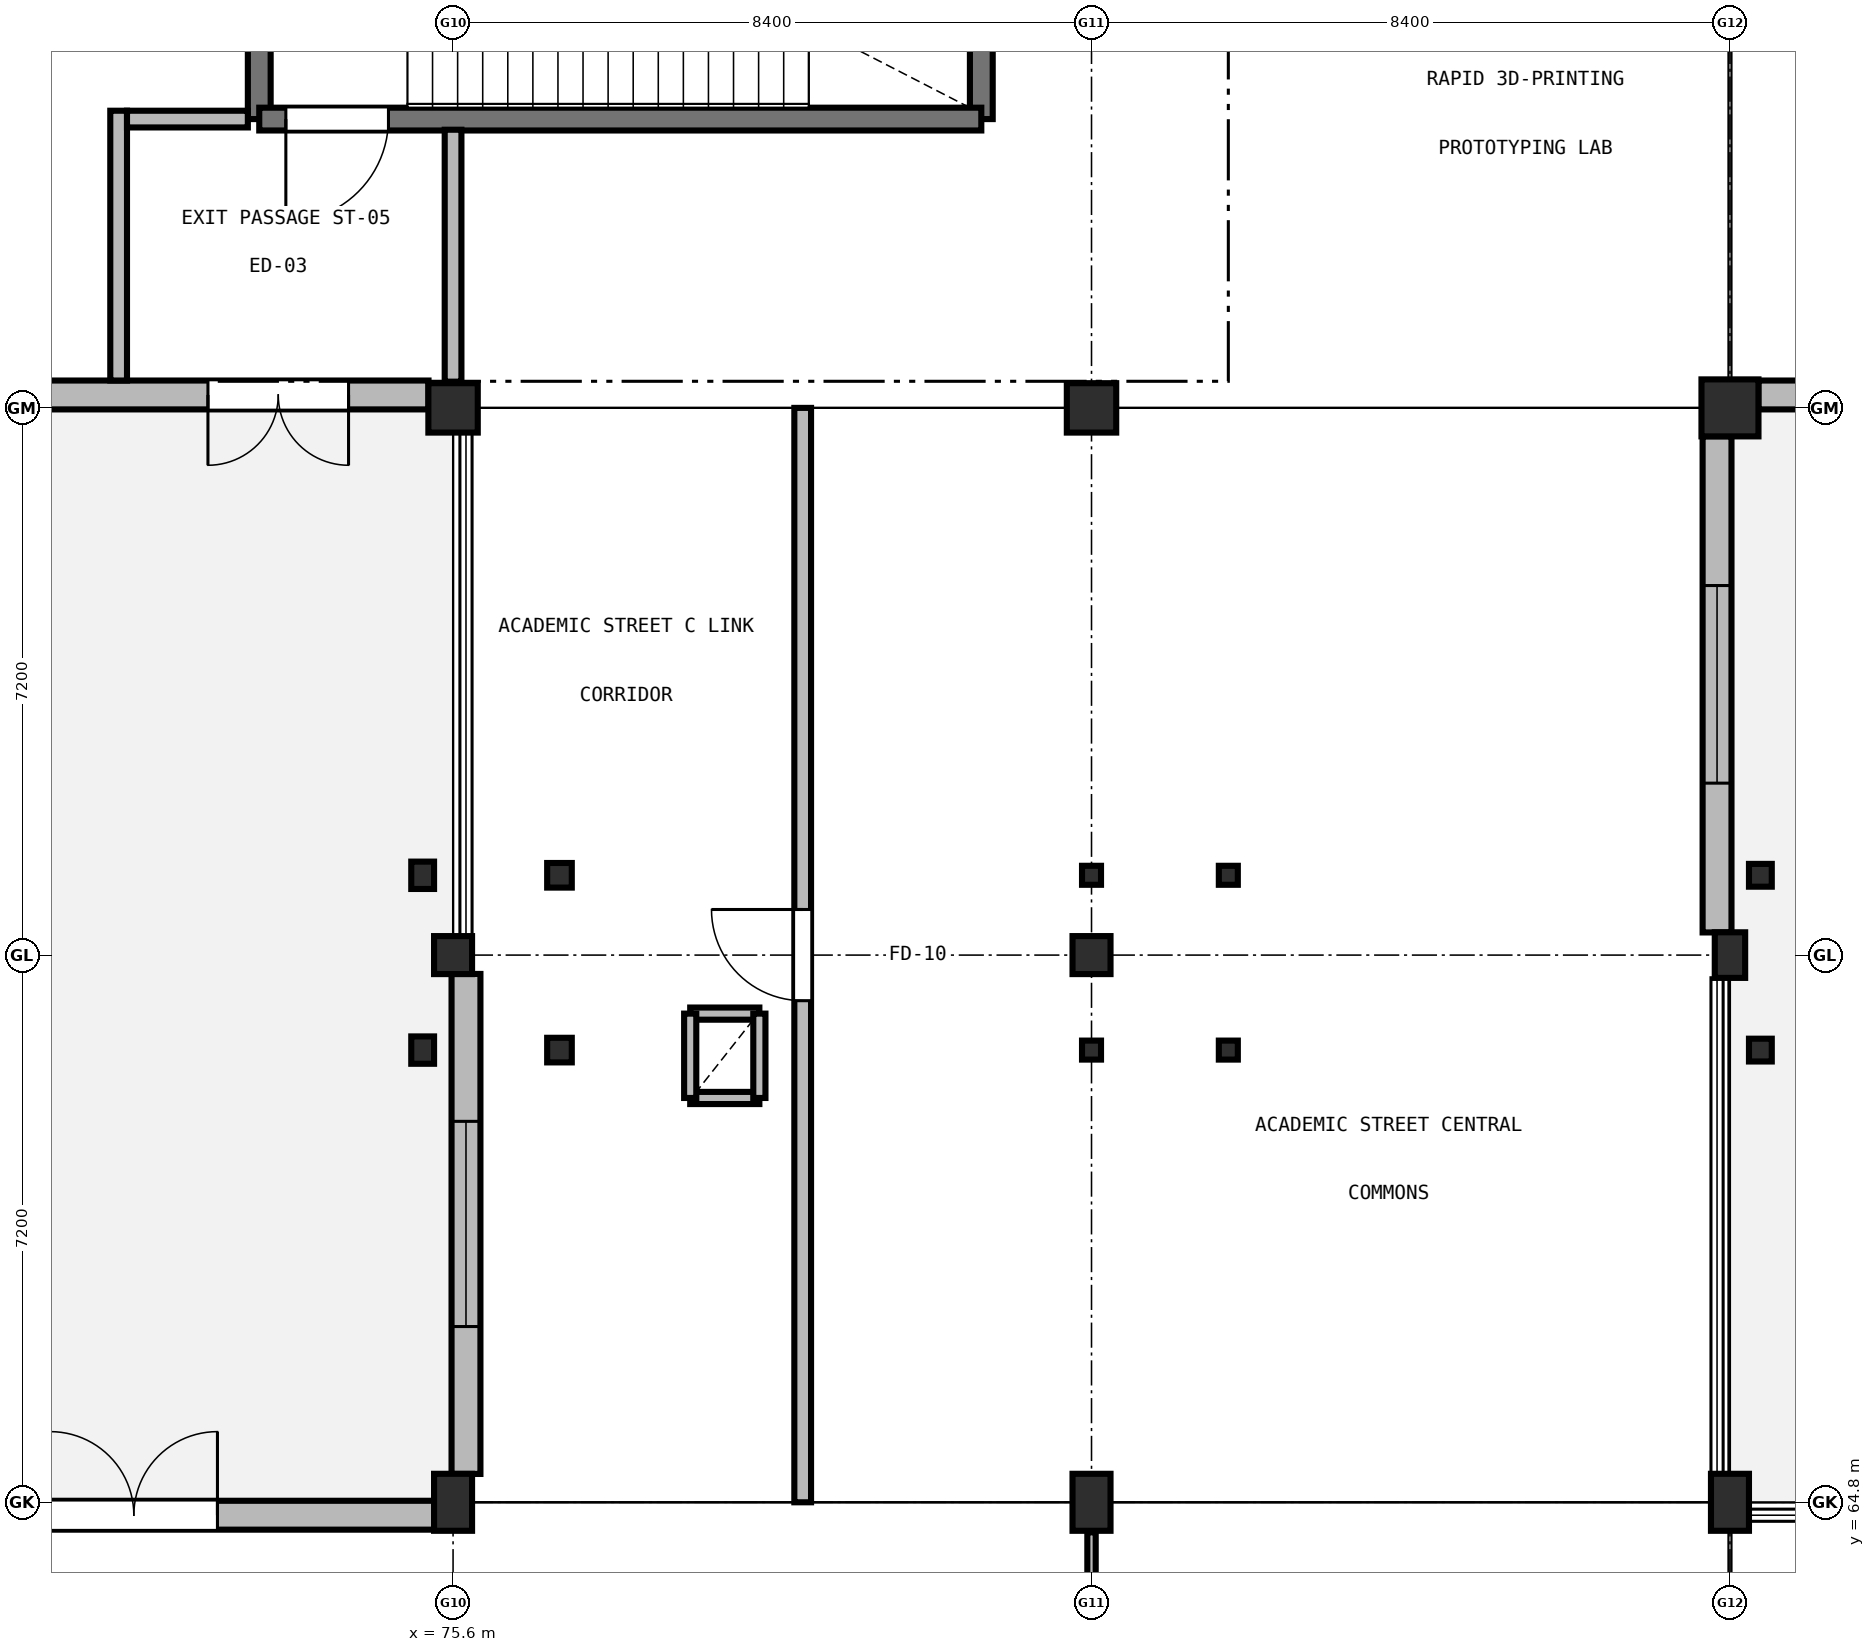
"""IFC4 building model, lengths in metres.
Left out: names, types, materials, properties, quantities, classifications, styles, units other than length and angle.
Written with IfcOpenShell. Run it as: python <this file> out.ifc"""

import sys

from ifc_helpers import new_model, si_unit, direction, frame, frame_2d, origin, origin_2d, place, context, subcontext, project, spatial, rectangle, hollow_rectangle, hollow_circle, i_section, extrude, element, fill, save


model = new_model("IFC4")
c1 = context("Model", 3, precision=1e-05, world=origin(), true_north=direction((0.0, 1.0)))
c2 = subcontext(c1, "Body", "Model", "MODEL_VIEW")
j1 = project(units=[si_unit("LENGTHUNIT", "METRE"), si_unit("PLANEANGLEUNIT", "RADIAN")], contexts=[c1])
p1 = place(None, origin())
s1 = spatial("IfcSite", under=j1, at=p1, CompositionType="ELEMENT")
p2 = place(p1, origin())
s2 = spatial("IfcBuilding", under=s1, at=p2, CompositionType="ELEMENT")
p3 = place(p2, origin())
s3 = spatial("IfcBuildingStorey", under=s2, at=p3, CompositionType="ELEMENT", Elevation=0.0)
p4 = place(p3, frame((75.6, 64.8, 0.0), z_axis=(0.0, 0.0, 1.0), x_axis=(1.0, 0.0, 0.0)))
e1 = element("IfcColumn", 1, at=p4, inside=s3, PredefinedType="COLUMN", context=c2, shape_type="SweptSolid", body=[
    extrude(rectangle(XDim=0.5, YDim=0.75, at=origin_2d()), origin(), (0.0, 0.0, 1.0), 5.1),
])
p5 = place(p3, frame((75.6, 72.0, 0.0), z_axis=(0.0, 0.0, 1.0), x_axis=(1.0, 0.0, 0.0)))
e2 = element("IfcColumn", 2, at=p5, inside=s3, PredefinedType="COLUMN", context=c2, shape_type="SweptSolid", body=[
    extrude(rectangle(XDim=0.5, YDim=0.5, at=origin_2d()), origin(), (0.0, 0.0, 1.0), 5.1),
])
p6 = place(p3, frame((75.6, 79.2, 0.0), z_axis=(0.0, 0.0, 1.0), x_axis=(1.0, 0.0, 0.0)))
e3 = element("IfcColumn", 3, at=p6, inside=s3, PredefinedType="COLUMN", context=c2, shape_type="SweptSolid", body=[
    extrude(rectangle(XDim=0.65, YDim=0.65, at=origin_2d()), origin(), (0.0, 0.0, 1.0), 5.1),
])
p7 = place(p3, frame((84.0, 64.8, 0.0), z_axis=(0.0, 0.0, 1.0), x_axis=(1.0, 0.0, 0.0)))
e4 = element("IfcColumn", 4, at=p7, inside=s3, PredefinedType="COLUMN", context=c2, shape_type="SweptSolid", body=[
    extrude(rectangle(XDim=0.5, YDim=0.75, at=origin_2d()), origin(), (0.0, 0.0, 1.0), 5.1),
])
p8 = place(p3, frame((84.0, 72.0, 0.0), z_axis=(0.0, 0.0, 1.0), x_axis=(1.0, 0.0, 0.0)))
e5 = element("IfcColumn", 5, at=p8, inside=s3, PredefinedType="COLUMN", context=c2, shape_type="SweptSolid", body=[
    extrude(rectangle(XDim=0.5, YDim=0.5, at=origin_2d()), origin(), (0.0, 0.0, 1.0), 5.1),
])
p9 = place(p3, frame((84.0, 79.2, 0.0), z_axis=(0.0, 0.0, 1.0), x_axis=(1.0, 0.0, 0.0)))
e6 = element("IfcColumn", 6, at=p9, inside=s3, PredefinedType="COLUMN", context=c2, shape_type="SweptSolid", body=[
    extrude(rectangle(XDim=0.65, YDim=0.65, at=origin_2d()), origin(), (0.0, 0.0, 1.0), 5.1),
])
p10 = place(p3, frame((92.4, 64.8, 0.0), z_axis=(0.0, 0.0, 1.0), x_axis=(1.0, 0.0, 0.0)))
e7 = element("IfcColumn", 7, at=p10, inside=s3, PredefinedType="COLUMN", context=c2, shape_type="SweptSolid", body=[
    extrude(rectangle(XDim=0.5, YDim=0.75, at=origin_2d()), origin(), (0.0, 0.0, 1.0), 5.1),
])
p11 = place(p3, frame((92.4, 72.0, 0.0), z_axis=(0.0, 0.0, 1.0), x_axis=(1.0, 0.0, 0.0)))
e8 = element("IfcColumn", 8, at=p11, inside=s3, PredefinedType="COLUMN", context=c2, shape_type="SweptSolid", body=[
    extrude(rectangle(XDim=0.4, YDim=0.6, at=origin_2d()), origin(), (0.0, 0.0, 1.0), 5.1),
])
p12 = place(p3, frame((92.4, 79.2, 0.0), z_axis=(0.0, 0.0, 1.0), x_axis=(1.0, 0.0, 0.0)))
e9 = element("IfcColumn", 9, at=p12, inside=s3, PredefinedType="COLUMN", context=c2, shape_type="SweptSolid", body=[
    extrude(rectangle(XDim=0.75, YDim=0.75, at=origin_2d()), origin(), (0.0, 0.0, 1.0), 5.1),
])
for number, where, z_axis, x_axis in (
    (10, (92.8, 70.75, 0.0), (0.0, 0.0, 1.0), (1.0, 0.0, 0.0)),
    (11, (92.8, 73.05, 0.0), (0.0, 0.0, 1.0), (1.0, 0.0, 0.0)),
):
    element("IfcColumn", number, at=place(p3, frame(where, z_axis=z_axis, x_axis=x_axis)), inside=s3, PredefinedType="COLUMN", context=c2, shape_type="SweptSolid", body=[
        extrude(i_section(OverallWidth=0.3, OverallDepth=0.3, WebThickness=0.011, FlangeThickness=0.019, FilletRadius=0.027, at=origin_2d()), origin(), (0.0, 0.0, 1.0), 5.1),
    ])
for number, where, z_axis, x_axis in (
    (12, (85.8, 70.75, 0.0), (0.0, 0.0, 1.0), (1.0, 0.0, 0.0)),
    (13, (85.8, 73.05, 0.0), (0.0, 0.0, 1.0), (1.0, 0.0, 0.0)),
    (14, (84.0, 70.75, 0.0), (0.0, 0.0, 1.0), (1.0, 0.0, 0.0)),
    (15, (84.0, 73.05, 0.0), (0.0, 0.0, 1.0), (1.0, 0.0, 0.0)),
):
    element("IfcColumn", number, at=place(p3, frame(where, z_axis=z_axis, x_axis=x_axis)), inside=s3, PredefinedType="COLUMN", context=c2, shape_type="SweptSolid", body=[
        extrude(hollow_rectangle(XDim=0.25, YDim=0.25, WallThickness=0.01, at=origin_2d()), origin(), (0.0, 0.0, 1.0), 5.1),
    ])
for number, where, z_axis, x_axis in (
    (16, (77.0, 70.75, 0.0), (0.0, 0.0, 1.0), (1.0, 0.0, 0.0)),
    (17, (77.0, 73.05, 0.0), (0.0, 0.0, 1.0), (1.0, 0.0, 0.0)),
):
    element("IfcColumn", number, at=place(p3, frame(where, z_axis=z_axis, x_axis=x_axis)), inside=s3, PredefinedType="COLUMN", context=c2, shape_type="SweptSolid", body=[
        extrude(hollow_circle(Radius=0.162, WallThickness=0.012, at=origin_2d()), origin(), (0.0, 0.0, 1.0), 5.1),
    ])
for number, where, z_axis, x_axis in (
    (18, (75.2, 70.75, 0.0), (0.0, 0.0, 1.0), (1.0, 0.0, 0.0)),
    (19, (75.2, 73.05, 0.0), (0.0, 0.0, 1.0), (1.0, 0.0, 0.0)),
):
    element("IfcColumn", number, at=place(p3, frame(where, z_axis=z_axis, x_axis=x_axis)), inside=s3, PredefinedType="COLUMN", context=c2, shape_type="SweptSolid", body=[
        extrude(i_section(OverallWidth=0.3, OverallDepth=0.36, WebThickness=0.012, FlangeThickness=0.022, FilletRadius=0.027, at=origin_2d()), origin(), (0.0, 0.0, 1.0), 5.1),
    ])
p13 = place(p3, frame((67.523, 64.63, 0.0), z_axis=(0.0, 0.0, 1.0), x_axis=(1.0, 0.0, 0.0)))
e20 = element("IfcWall", 20, at=p13, inside=s3, PredefinedType="SOLIDWALL", context=c2, shape_type="SweptSolid", body=[
    extrude(rectangle(XDim=7.829, YDim=0.38, at=frame_2d((3.915, 0.0))), origin(), (0.0, 0.0, 1.0), 4.01),
])
p14 = place(p13, frame((2.777, 0.0, 0.0)))
e21 = element("IfcOpeningElement", 21, at=p14, cuts=e20, PredefinedType="OPENING", context=c2, shape_type="SweptSolid", body=[
    extrude(rectangle(XDim=2.2, YDim=2.4, at=frame_2d((1.1, 1.2))), frame((0.0, 0.2, 0.0), z_axis=(0.0, -1.0, 0.0), x_axis=(1.0, 0.0, 0.0)), (0.0, 0.0, 1.0), 0.4),
])
p15 = place(p3, frame((75.77, 65.173, 0.0), z_axis=(0.0, 0.0, 1.0), x_axis=(0.0, 1.0, 0.0)))
e22 = element("IfcWall", 22, at=p15, inside=s3, PredefinedType="SOLIDWALL", context=c2, shape_type="SweptSolid", body=[
    extrude(rectangle(XDim=6.579, YDim=0.38, at=frame_2d((3.29, 0.0))), origin(), (0.0, 0.0, 1.0), 4.11),
])
p16 = place(p15, frame((1.939, 0.0, 0.95)))
e23 = element("IfcOpeningElement", 23, at=p16, cuts=e22, PredefinedType="OPENING", context=c2, shape_type="SweptSolid", body=[
    extrude(rectangle(XDim=2.7, YDim=1.9, at=frame_2d((1.35, 0.95))), frame((0.0, 0.2, 0.0), z_axis=(0.0, -1.0, 0.0), x_axis=(1.0, 0.0, 0.0)), (0.0, 0.0, 1.0), 0.4),
])
p17 = place(p3, frame((75.277, 79.37, 0.0), z_axis=(0.0, 0.0, 1.0), x_axis=(-1.0, 0.0, 0.0)))
e24 = element("IfcWall", 24, at=p17, inside=s3, PredefinedType="SOLIDWALL", context=c2, shape_type="SweptSolid", body=[
    extrude(rectangle(XDim=7.754, YDim=0.38, at=frame_2d((3.877, 0.0))), origin(), (0.0, 0.0, 1.0), 4.01),
])
p18 = place(p17, frame((1.052, 0.0, 0.0)))
e25 = element("IfcOpeningElement", 25, at=p18, cuts=e24, PredefinedType="OPENING", context=c2, shape_type="SweptSolid", body=[
    extrude(rectangle(XDim=1.85, YDim=2.3, at=frame_2d((0.925, 1.15))), frame((0.0, 0.2, 0.0), z_axis=(0.0, -1.0, 0.0), x_axis=(1.0, 0.0, 0.0)), (0.0, 0.0, 1.0), 0.4),
])
p19 = place(p3, frame((100.477, 79.37, 0.0), z_axis=(0.0, 0.0, 1.0), x_axis=(-1.0, 0.0, 0.0)))
e26 = element("IfcWall", 26, at=p19, inside=s3, PredefinedType="SOLIDWALL", context=c2, shape_type="SweptSolid", body=[
    extrude(rectangle(XDim=7.704, YDim=0.38, at=frame_2d((3.852, 0.0))), origin(), (0.0, 0.0, 1.0), 4.01),
])
p20 = place(p19, frame((2.452, 0.0, 0.95)))
e27 = element("IfcOpeningElement", 27, at=p20, cuts=e26, PredefinedType="OPENING", context=c2, shape_type="SweptSolid", body=[
    extrude(rectangle(XDim=2.8, YDim=2.0, at=frame_2d((1.4, 1.0))), frame((0.0, 0.2, 0.0), z_axis=(0.0, -1.0, 0.0), x_axis=(1.0, 0.0, 0.0)), (0.0, 0.0, 1.0), 0.4),
])
p21 = place(p3, frame((92.23, 78.827, 0.0), z_axis=(0.0, 0.0, 1.0), x_axis=(0.0, -1.0, 0.0)))
e28 = element("IfcWall", 28, at=p21, inside=s3, PredefinedType="SOLIDWALL", context=c2, shape_type="SweptSolid", body=[
    extrude(rectangle(XDim=6.529, YDim=0.38, at=frame_2d((3.264, 0.0))), origin(), (0.0, 0.0, 1.0), 4.76),
])
p22 = place(p21, frame((1.965, 0.0, 0.95)))
e29 = element("IfcOpeningElement", 29, at=p22, cuts=e28, PredefinedType="OPENING", context=c2, shape_type="SweptSolid", body=[
    extrude(rectangle(XDim=2.6, YDim=1.8, at=frame_2d((1.3, 0.9))), frame((0.0, 0.2, 0.0), z_axis=(0.0, -1.0, 0.0), x_axis=(1.0, 0.0, 0.0)), (0.0, 0.0, 1.0), 0.4),
])
for number, where, z_axis, x_axis in (
    (30, (73.05, 83.0, 0.0), (0.0, 0.0, 1.0), (0.0, 1.0, 0.0)),
    (31, (82.55, 87.1, 0.0), (0.0, 0.0, 1.0), (0.0, -1.0, 0.0)),
):
    element("IfcWall", number, at=place(p3, frame(where, z_axis=z_axis, x_axis=x_axis)), inside=s3, PredefinedType="SHEAR", context=c2, shape_type="SweptSolid", body=[
        extrude(rectangle(XDim=4.1, YDim=0.3, at=frame_2d((2.05, 0.0))), origin(), (0.0, 0.0, 1.0), 4.82),
    ])
p23 = place(p3, frame((82.55, 83.0, 0.0), z_axis=(0.0, 0.0, 1.0), x_axis=(-1.0, 0.0, 0.0)))
e32 = element("IfcWall", 32, at=p23, inside=s3, PredefinedType="SHEAR", context=c2, shape_type="SweptSolid", body=[
    extrude(rectangle(XDim=9.5, YDim=0.3, at=frame_2d((4.75, 0.0))), origin(), (0.0, 0.0, 1.0), 4.82),
])
p24 = place(p23, frame((7.8, 0.0, 0.0)))
e33 = element("IfcOpeningElement", 33, at=p24, cuts=e32, PredefinedType="OPENING", context=c2, shape_type="SweptSolid", body=[
    extrude(rectangle(XDim=1.35, YDim=2.2, at=frame_2d((0.675, 1.1))), frame((0.0, 0.16, 0.0), z_axis=(0.0, -1.0, 0.0), x_axis=(1.0, 0.0, 0.0)), (0.0, 0.0, 1.0), 0.32),
])
for number, where, z_axis, x_axis in (
    (34, (78.72, 70.12, 0.0), (0.0, 0.0, 1.0), (1.0, 0.0, 0.0)),
    (35, (79.63, 71.23, 0.0), (0.0, 0.0, 1.0), (-1.0, 0.0, 0.0)),
):
    element("IfcWall", number, at=place(p3, frame(where, z_axis=z_axis, x_axis=x_axis)), inside=s3, PredefinedType="PARTITIONING", context=c2, shape_type="SweptSolid", body=[
        extrude(rectangle(XDim=0.91, YDim=0.16, at=frame_2d((0.455, 0.0))), origin(), (0.0, 0.0, 1.0), 4.55),
    ])
for number, where, z_axis, x_axis in (
    (36, (78.72, 71.23, 0.0), (0.0, 0.0, 1.0), (0.0, -1.0, 0.0)),
    (37, (79.63, 70.12, 0.0), (0.0, 0.0, 1.0), (0.0, 1.0, 0.0)),
):
    element("IfcWall", number, at=place(p3, frame(where, z_axis=z_axis, x_axis=x_axis)), inside=s3, PredefinedType="PARTITIONING", context=c2, shape_type="SweptSolid", body=[
        extrude(rectangle(XDim=1.11, YDim=0.16, at=frame_2d((0.555, 0.0))), origin(), (0.0, 0.0, 1.0), 4.55),
    ])
p25 = place(p3, frame((75.6, 79.545, 0.0), z_axis=(0.0, 0.0, 1.0), x_axis=(0.0, 1.0, 0.0)))
e38 = element("IfcWall", 38, at=p25, inside=s3, PredefinedType="SOLIDWALL", context=c2, shape_type="SweptSolid", body=[
    extrude(rectangle(XDim=3.315, YDim=0.22, at=frame_2d((1.658, 0.0))), origin(), (0.0, 0.0, 1.0), 4.005),
])
p26 = place(p3, frame((84.0, 60.7, 0.0), z_axis=(0.0, 0.0, 1.0), x_axis=(0.0, 1.0, 0.0)))
e39 = element("IfcWall", 39, at=p26, inside=s3, PredefinedType="PARTITIONING", context=c2, shape_type="SweptSolid", body=[
    extrude(rectangle(XDim=3.705, YDim=0.11, at=frame_2d((1.853, 0.0))), origin(), (0.0, 0.0, 1.0), 4.005),
])
p27 = place(p3, frame((80.2, 64.8, 0.0), z_axis=(0.0, 0.0, 1.0), x_axis=(0.0, 1.0, 0.0)))
e40 = element("IfcWall", 40, at=p27, inside=s3, PredefinedType="SOLIDWALL", context=c2, shape_type="SweptSolid", body=[
    extrude(rectangle(XDim=14.4, YDim=0.22, at=frame_2d((7.2, 0.0))), origin(), (0.0, 0.0, 1.0), 4.005),
])
p28 = place(p27, frame((6.6, 0.0, 0.0)))
e41 = element("IfcOpeningElement", 41, at=p28, cuts=e40, PredefinedType="OPENING", context=c2, shape_type="SweptSolid", body=[
    extrude(rectangle(XDim=1.2, YDim=2.15, at=frame_2d((0.6, 1.075))), frame((0.0, 0.12, 0.0), z_axis=(0.0, -1.0, 0.0), x_axis=(1.0, 0.0, 0.0)), (0.0, 0.0, 1.0), 0.24),
])
p29 = place(p3, frame((71.2, 79.56, 0.0), z_axis=(0.0, 0.0, 1.0), x_axis=(0.0, 1.0, 0.0)))
e42 = element("IfcWall", 42, at=p29, inside=s3, PredefinedType="SOLIDWALL", context=c2, shape_type="SweptSolid", body=[
    extrude(rectangle(XDim=3.55, YDim=0.22, at=frame_2d((1.775, 0.0))), origin(), (0.0, 0.0, 1.0), 4.005),
])
p30 = place(p3, frame((71.31, 83.0, 0.0), z_axis=(0.0, 0.0, 1.0), x_axis=(1.0, 0.0, 0.0)))
e43 = element("IfcWall", 43, at=p30, inside=s3, PredefinedType="SOLIDWALL", context=c2, shape_type="SweptSolid", body=[
    extrude(rectangle(XDim=1.59, YDim=0.22, at=frame_2d((0.795, 0.0))), origin(), (0.0, 0.0, 1.0), 4.75),
])
p31 = place(p14, origin())
e44 = element("IfcDoor", 44, at=p31, inside=s3, OperationType="DOUBLE_DOOR_SINGLE_SWING", PredefinedType="DOOR", context=c2, shape_type="SweptSolid", body=[
    extrude(rectangle(XDim=2.2, YDim=2.4, at=frame_2d((1.1, 1.2))), frame((0.0, 0.025, 0.0), z_axis=(0.0, -1.0, 0.0), x_axis=(1.0, 0.0, 0.0)), (0.0, 0.0, 1.0), 0.05),
])
fill(e21, e44)
p32 = place(p16, origin())
e45 = element("IfcWindow", 45, at=p32, inside=s3, PartitioningType="SINGLE_PANEL", PredefinedType="WINDOW", context=c2, shape_type="SweptSolid", body=[
    extrude(rectangle(XDim=2.7, YDim=1.9, at=frame_2d((1.35, 0.95))), frame((0.0, 0.03, 0.0), z_axis=(0.0, -1.0, 0.0), x_axis=(1.0, 0.0, 0.0)), (0.0, 0.0, 1.0), 0.06),
])
fill(e23, e45)
p33 = place(p18, origin())
e46 = element("IfcDoor", 46, at=p33, inside=s3, OperationType="DOUBLE_DOOR_SINGLE_SWING", PredefinedType="DOOR", context=c2, shape_type="SweptSolid", body=[
    extrude(rectangle(XDim=1.85, YDim=2.3, at=frame_2d((0.925, 1.15))), frame((0.0, 0.025, 0.0), z_axis=(0.0, -1.0, 0.0), x_axis=(1.0, 0.0, 0.0)), (0.0, 0.0, 1.0), 0.05),
])
fill(e25, e46)
p34 = place(p22, origin())
e47 = element("IfcWindow", 47, at=p34, inside=s3, PartitioningType="SINGLE_PANEL", PredefinedType="WINDOW", context=c2, shape_type="SweptSolid", body=[
    extrude(rectangle(XDim=2.6, YDim=1.8, at=frame_2d((1.3, 0.9))), frame((0.0, 0.03, 0.0), z_axis=(0.0, -1.0, 0.0), x_axis=(1.0, 0.0, 0.0)), (0.0, 0.0, 1.0), 0.06),
])
fill(e29, e47)
p35 = place(p28, origin())
e48 = element("IfcDoor", 48, at=p35, inside=s3, OperationType="SINGLE_SWING_RIGHT", PredefinedType="DOOR", context=c2, shape_type="SweptSolid", body=[
    extrude(rectangle(XDim=1.2, YDim=2.15, at=frame_2d((0.6, 1.075))), frame((0.0, 0.025, 0.0), z_axis=(0.0, -1.0, 0.0), x_axis=(1.0, 0.0, 0.0)), (0.0, 0.0, 1.0), 0.05),
])
fill(e41, e48)
p36 = place(p24, origin())
e49 = element("IfcDoor", 49, at=p36, inside=s3, OperationType="SINGLE_SWING_RIGHT", PredefinedType="DOOR", context=c2, shape_type="SweptSolid", body=[
    extrude(rectangle(XDim=1.35, YDim=2.2, at=frame_2d((0.675, 1.1))), frame((0.0, 0.025, 0.0), z_axis=(0.0, -1.0, 0.0), x_axis=(1.0, 0.0, 0.0)), (0.0, 0.0, 1.0), 0.05),
])
fill(e33, e49)
save(model, sys.argv[1])
